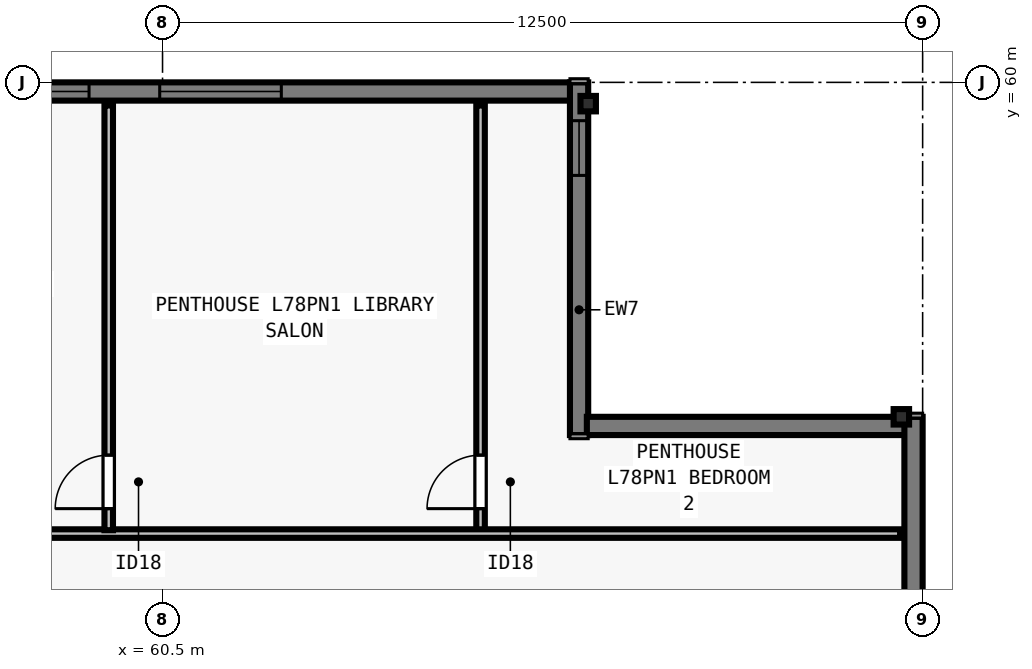
"""IFC4 building model, lengths in metres.
Left out: names, types, materials, properties, quantities, classifications, styles, units other than length and angle.
Written with IfcOpenShell. Run it as: python <this file> out.ifc"""

import sys

from ifc_helpers import new_model, si_unit, direction, frame, frame_2d, origin, origin_2d, place, context, subcontext, project, spatial, rectangle, i_section, extrude, element, fill, save


model = new_model("IFC4")
c1 = context("Model", 3, precision=1e-05, world=origin(), true_north=direction((0.0, 1.0)))
c2 = subcontext(c1, "Body", "Model", "MODEL_VIEW")
j1 = project(units=[si_unit("LENGTHUNIT", "METRE"), si_unit("PLANEANGLEUNIT", "RADIAN")], contexts=[c1])
p1 = place(None, origin())
s1 = spatial("IfcSite", under=j1, at=p1, CompositionType="ELEMENT")
p2 = place(p1, origin())
s2 = spatial("IfcBuilding", under=s1, at=p2, CompositionType="ELEMENT")
p3 = place(p2, frame((0.0, 0.0, 284.0)))
s3 = spatial("IfcBuildingStorey", under=s2, at=p3, CompositionType="ELEMENT", Elevation=284.0)
for number, where, z_axis, x_axis in (
    (1, (72.65, 54.5, 0.0), (0.0, 0.0, 1.0), (0.0, 1.0, 0.0)),
    (2, (67.5, 59.65, 0.0), (0.0, 0.0, 1.0), (1.0, 0.0, 0.0)),
):
    element("IfcColumn", number, at=place(p3, frame(where, z_axis=z_axis, x_axis=x_axis)), inside=s3, PredefinedType="COLUMN", context=c2, shape_type="SweptSolid", body=[
        extrude(i_section(OverallWidth=0.254, OverallDepth=0.254, WebThickness=0.009, FlangeThickness=0.014, FilletRadius=0.013, at=origin_2d()), origin(), (0.0, 0.0, 1.0), 3.5),
    ])
p4 = place(p3, frame((36.5, 59.85, 0.0), z_axis=(0.0, 0.0, 1.0), x_axis=(1.0, 0.0, 0.0)))
e3 = element("IfcWall", 3, at=p4, inside=s3, PredefinedType="SOLIDWALL", context=c2, shape_type="SweptSolid", body=[
    extrude(rectangle(XDim=30.722, YDim=0.3, at=frame_2d((15.361, 0.0))), origin(), (0.0, 0.0, 1.0), 3.29),
])
p5 = place(p4, frame((4.944, 0.0, 0.8)))
e4 = element("IfcOpeningElement", 4, at=p5, cuts=e3, PredefinedType="OPENING", context=c2, shape_type="SweptSolid", body=[
    extrude(rectangle(XDim=1.65, YDim=1.758, at=frame_2d((0.825, 0.879))), frame((0.0, 0.16, 0.0), z_axis=(0.0, -1.0, 0.0), x_axis=(1.0, 0.0, 0.0)), (0.0, 0.0, 1.0), 0.32),
])
p6 = place(p4, frame((7.756, 0.0, 0.8)))
e5 = element("IfcOpeningElement", 5, at=p6, cuts=e3, PredefinedType="OPENING", context=c2, shape_type="SweptSolid", body=[
    extrude(rectangle(XDim=2.0, YDim=1.758, at=frame_2d((1.0, 0.879))), frame((0.0, 0.16, 0.0), z_axis=(0.0, -1.0, 0.0), x_axis=(1.0, 0.0, 0.0)), (0.0, 0.0, 1.0), 0.32),
])
p7 = place(p4, frame((12.617, 0.0, 0.8)))
e6 = element("IfcOpeningElement", 6, at=p7, cuts=e3, PredefinedType="OPENING", context=c2, shape_type="SweptSolid", body=[
    extrude(rectangle(XDim=1.65, YDim=1.758, at=frame_2d((0.825, 0.879))), frame((0.0, 0.16, 0.0), z_axis=(0.0, -1.0, 0.0), x_axis=(1.0, 0.0, 0.0)), (0.0, 0.0, 1.0), 0.32),
])
p8 = place(p4, frame((17.53, 0.0, 0.8)))
e7 = element("IfcOpeningElement", 7, at=p8, cuts=e3, PredefinedType="OPENING", context=c2, shape_type="SweptSolid", body=[
    extrude(rectangle(XDim=2.0, YDim=1.758, at=frame_2d((1.0, 0.879))), frame((0.0, 0.16, 0.0), z_axis=(0.0, -1.0, 0.0), x_axis=(1.0, 0.0, 0.0)), (0.0, 0.0, 1.0), 0.32),
])
p9 = place(p4, frame((21.142, 0.0, 0.8)))
e8 = element("IfcOpeningElement", 8, at=p9, cuts=e3, PredefinedType="OPENING", context=c2, shape_type="SweptSolid", body=[
    extrude(rectangle(XDim=1.65, YDim=1.758, at=frame_2d((0.825, 0.879))), frame((0.0, 0.16, 0.0), z_axis=(0.0, -1.0, 0.0), x_axis=(1.0, 0.0, 0.0)), (0.0, 0.0, 1.0), 0.32),
])
p10 = place(p4, frame((23.954, 0.0, 0.8)))
e9 = element("IfcOpeningElement", 9, at=p10, cuts=e3, PredefinedType="OPENING", context=c2, shape_type="SweptSolid", body=[
    extrude(rectangle(XDim=2.0, YDim=1.758, at=frame_2d((1.0, 0.879))), frame((0.0, 0.16, 0.0), z_axis=(0.0, -1.0, 0.0), x_axis=(1.0, 0.0, 0.0)), (0.0, 0.0, 1.0), 0.32),
])
p11 = place(p3, frame((67.35, 60.0, 0.0), z_axis=(0.0, 0.0, 1.0), x_axis=(0.0, -1.0, 0.0)))
e10 = element("IfcWall", 10, at=p11, inside=s3, PredefinedType="SOLIDWALL", context=c2, shape_type="SweptSolid", body=[
    extrude(rectangle(XDim=5.8, YDim=0.3, at=frame_2d((2.9, 0.0))), origin(), (0.0, 0.0, 1.0), 3.29),
])
p12 = place(p11, frame((0.63, 0.0, 0.8)))
e11 = element("IfcOpeningElement", 11, at=p12, cuts=e10, PredefinedType="OPENING", context=c2, shape_type="SweptSolid", body=[
    extrude(rectangle(XDim=0.9, YDim=1.75, at=frame_2d((0.45, 0.875))), frame((0.0, 0.16, 0.0), z_axis=(0.0, -1.0, 0.0), x_axis=(1.0, 0.0, 0.0)), (0.0, 0.0, 1.0), 0.32),
])
p13 = place(p3, frame((67.478, 54.35, 0.0), z_axis=(0.0, 0.0, 1.0), x_axis=(1.0, 0.0, 0.0)))
e12 = element("IfcWall", 12, at=p13, inside=s3, PredefinedType="SOLIDWALL", context=c2, shape_type="SweptSolid", body=[
    extrude(rectangle(XDim=5.244, YDim=0.3, at=frame_2d((2.622, 0.0))), origin(), (0.0, 0.0, 1.0), 3.29),
])
p14 = place(p3, frame((72.85, 54.5, 0.0), z_axis=(0.0, 0.0, 1.0), x_axis=(0.0, -1.0, 0.0)))
e13 = element("IfcWall", 13, at=p14, inside=s3, PredefinedType="SOLIDWALL", context=c2, shape_type="SweptSolid", body=[
    extrude(rectangle(XDim=30.722, YDim=0.3, at=frame_2d((15.361, 0.0))), origin(), (0.0, 0.0, 1.0), 3.29),
])
p15 = place(p14, frame((7.756, 0.0, 0.8)))
e14 = element("IfcOpeningElement", 14, at=p15, cuts=e13, PredefinedType="OPENING", context=c2, shape_type="SweptSolid", body=[
    extrude(rectangle(XDim=2.0, YDim=1.758, at=frame_2d((1.0, 0.879))), frame((0.0, 0.16, 0.0), z_axis=(0.0, -1.0, 0.0), x_axis=(1.0, 0.0, 0.0)), (0.0, 0.0, 1.0), 0.32),
])
p16 = place(p14, frame((11.768, 0.0, 0.8)))
e15 = element("IfcOpeningElement", 15, at=p16, cuts=e13, PredefinedType="OPENING", context=c2, shape_type="SweptSolid", body=[
    extrude(rectangle(XDim=1.65, YDim=1.758, at=frame_2d((0.825, 0.879))), frame((0.0, 0.16, 0.0), z_axis=(0.0, -1.0, 0.0), x_axis=(1.0, 0.0, 0.0)), (0.0, 0.0, 1.0), 0.32),
])
p17 = place(p14, frame((16.28, 0.0, 0.8)))
e16 = element("IfcOpeningElement", 16, at=p17, cuts=e13, PredefinedType="OPENING", context=c2, shape_type="SweptSolid", body=[
    extrude(rectangle(XDim=2.0, YDim=1.758, at=frame_2d((1.0, 0.879))), frame((0.0, 0.16, 0.0), z_axis=(0.0, -1.0, 0.0), x_axis=(1.0, 0.0, 0.0)), (0.0, 0.0, 1.0), 0.32),
])
p18 = place(p14, frame((21.142, 0.0, 0.8)))
e17 = element("IfcOpeningElement", 17, at=p18, cuts=e13, PredefinedType="OPENING", context=c2, shape_type="SweptSolid", body=[
    extrude(rectangle(XDim=1.65, YDim=1.758, at=frame_2d((0.825, 0.879))), frame((0.0, 0.16, 0.0), z_axis=(0.0, -1.0, 0.0), x_axis=(1.0, 0.0, 0.0)), (0.0, 0.0, 1.0), 0.32),
])
p19 = place(p3, frame((65.73, 52.54, 0.0), z_axis=(0.0, 0.0, 1.0), x_axis=(0.0, 1.0, 0.0)))
e18 = element("IfcWall", 18, at=p19, inside=s3, PredefinedType="PARTITIONING", context=c2, shape_type="SweptSolid", body=[
    extrude(rectangle(XDim=7.08, YDim=0.14, at=frame_2d((3.54, 0.0))), origin(), (0.0, 0.0, 1.0), 2.653),
])
p20 = place(p19, frame((0.45, 0.0, 0.0)))
e19 = element("IfcOpeningElement", 19, at=p20, cuts=e18, PredefinedType="OPENING", context=c2, shape_type="SweptSolid", body=[
    extrude(rectangle(XDim=0.88, YDim=2.1, at=frame_2d((0.44, 1.05))), frame((0.0, 0.08, 0.0), z_axis=(0.0, -1.0, 0.0), x_axis=(1.0, 0.0, 0.0)), (0.0, 0.0, 1.0), 0.16),
])
p21 = place(p3, frame((56.45, 52.58, 0.0), z_axis=(0.0, 0.0, 1.0), x_axis=(1.0, 0.0, 0.0)))
e20 = element("IfcWall", 20, at=p21, inside=s3, PredefinedType="PARTITIONING", context=c2, shape_type="SweptSolid", body=[
    extrude(rectangle(XDim=16.18, YDim=0.14, at=frame_2d((8.09, 0.0))), origin(), (0.0, 0.0, 1.0), 3.009),
])
p22 = place(p21, frame((0.4, 0.0, 0.0)))
e21 = element("IfcOpeningElement", 21, at=p22, cuts=e20, PredefinedType="OPENING", context=c2, shape_type="SweptSolid", body=[
    extrude(rectangle(XDim=0.82, YDim=2.1, at=frame_2d((0.41, 1.05))), frame((0.0, 0.08, 0.0), z_axis=(0.0, -1.0, 0.0), x_axis=(1.0, 0.0, 0.0)), (0.0, 0.0, 1.0), 0.16),
])
p23 = place(p3, frame((59.615, 52.635, 0.0), z_axis=(0.0, 0.0, 1.0), x_axis=(0.0, 1.0, 0.0)))
e22 = element("IfcWall", 22, at=p23, inside=s3, PredefinedType="PARTITIONING", context=c2, shape_type="SweptSolid", body=[
    extrude(rectangle(XDim=6.985, YDim=0.14, at=frame_2d((3.493, 0.0))), origin(), (0.0, 0.0, 1.0), 3.29),
])
p24 = place(p23, frame((0.355, 0.0, 0.0)))
e23 = element("IfcOpeningElement", 23, at=p24, cuts=e22, PredefinedType="OPENING", context=c2, shape_type="SweptSolid", body=[
    extrude(rectangle(XDim=0.88, YDim=2.1, at=frame_2d((0.44, 1.05))), frame((0.0, 0.08, 0.0), z_axis=(0.0, -1.0, 0.0), x_axis=(1.0, 0.0, 0.0)), (0.0, 0.0, 1.0), 0.16),
])
p25 = place(p9, origin())
e24 = element("IfcWindow", 24, at=p25, inside=s3, PartitioningType="SINGLE_PANEL", PredefinedType="WINDOW", context=c2, shape_type="SweptSolid", body=[
    extrude(rectangle(XDim=1.65, YDim=1.758, at=frame_2d((0.825, 0.879))), frame((0.0, -0.05, 0.0), z_axis=(0.0, -1.0, 0.0), x_axis=(1.0, 0.0, 0.0)), (0.0, 0.0, 1.0), 0.06),
])
fill(e8, e24)
p26 = place(p10, origin())
e25 = element("IfcWindow", 25, at=p26, inside=s3, PartitioningType="SINGLE_PANEL", PredefinedType="WINDOW", context=c2, shape_type="SweptSolid", body=[
    extrude(rectangle(XDim=2.0, YDim=1.758, at=frame_2d((1.0, 0.879))), frame((0.0, -0.05, 0.0), z_axis=(0.0, -1.0, 0.0), x_axis=(1.0, 0.0, 0.0)), (0.0, 0.0, 1.0), 0.06),
])
fill(e9, e25)
p27 = place(p12, origin())
e26 = element("IfcWindow", 26, at=p27, inside=s3, PartitioningType="SINGLE_PANEL", PredefinedType="WINDOW", context=c2, shape_type="SweptSolid", body=[
    extrude(rectangle(XDim=0.9, YDim=1.75, at=frame_2d((0.45, 0.875))), frame((0.0, -0.04, 0.0), z_axis=(0.0, -1.0, 0.0), x_axis=(1.0, 0.0, 0.0)), (0.0, 0.0, 1.0), 0.06),
])
fill(e11, e26)
p28 = place(p20, origin())
e27 = element("IfcDoor", 27, at=p28, inside=s3, OperationType="SINGLE_SWING_LEFT", PredefinedType="DOOR", context=c2, shape_type="SweptSolid", body=[
    extrude(rectangle(XDim=0.88, YDim=2.1, at=frame_2d((0.44, 1.05))), frame((0.0, 0.025, 0.0), z_axis=(0.0, -1.0, 0.0), x_axis=(1.0, 0.0, 0.0)), (0.0, 0.0, 1.0), 0.05),
])
fill(e19, e27)
p29 = place(p24, origin())
e28 = element("IfcDoor", 28, at=p29, inside=s3, OperationType="SINGLE_SWING_LEFT", PredefinedType="DOOR", context=c2, shape_type="SweptSolid", body=[
    extrude(rectangle(XDim=0.88, YDim=2.1, at=frame_2d((0.44, 1.05))), frame((0.0, 0.025, 0.0), z_axis=(0.0, -1.0, 0.0), x_axis=(1.0, 0.0, 0.0)), (0.0, 0.0, 1.0), 0.05),
])
fill(e23, e28)
save(model, sys.argv[1])
